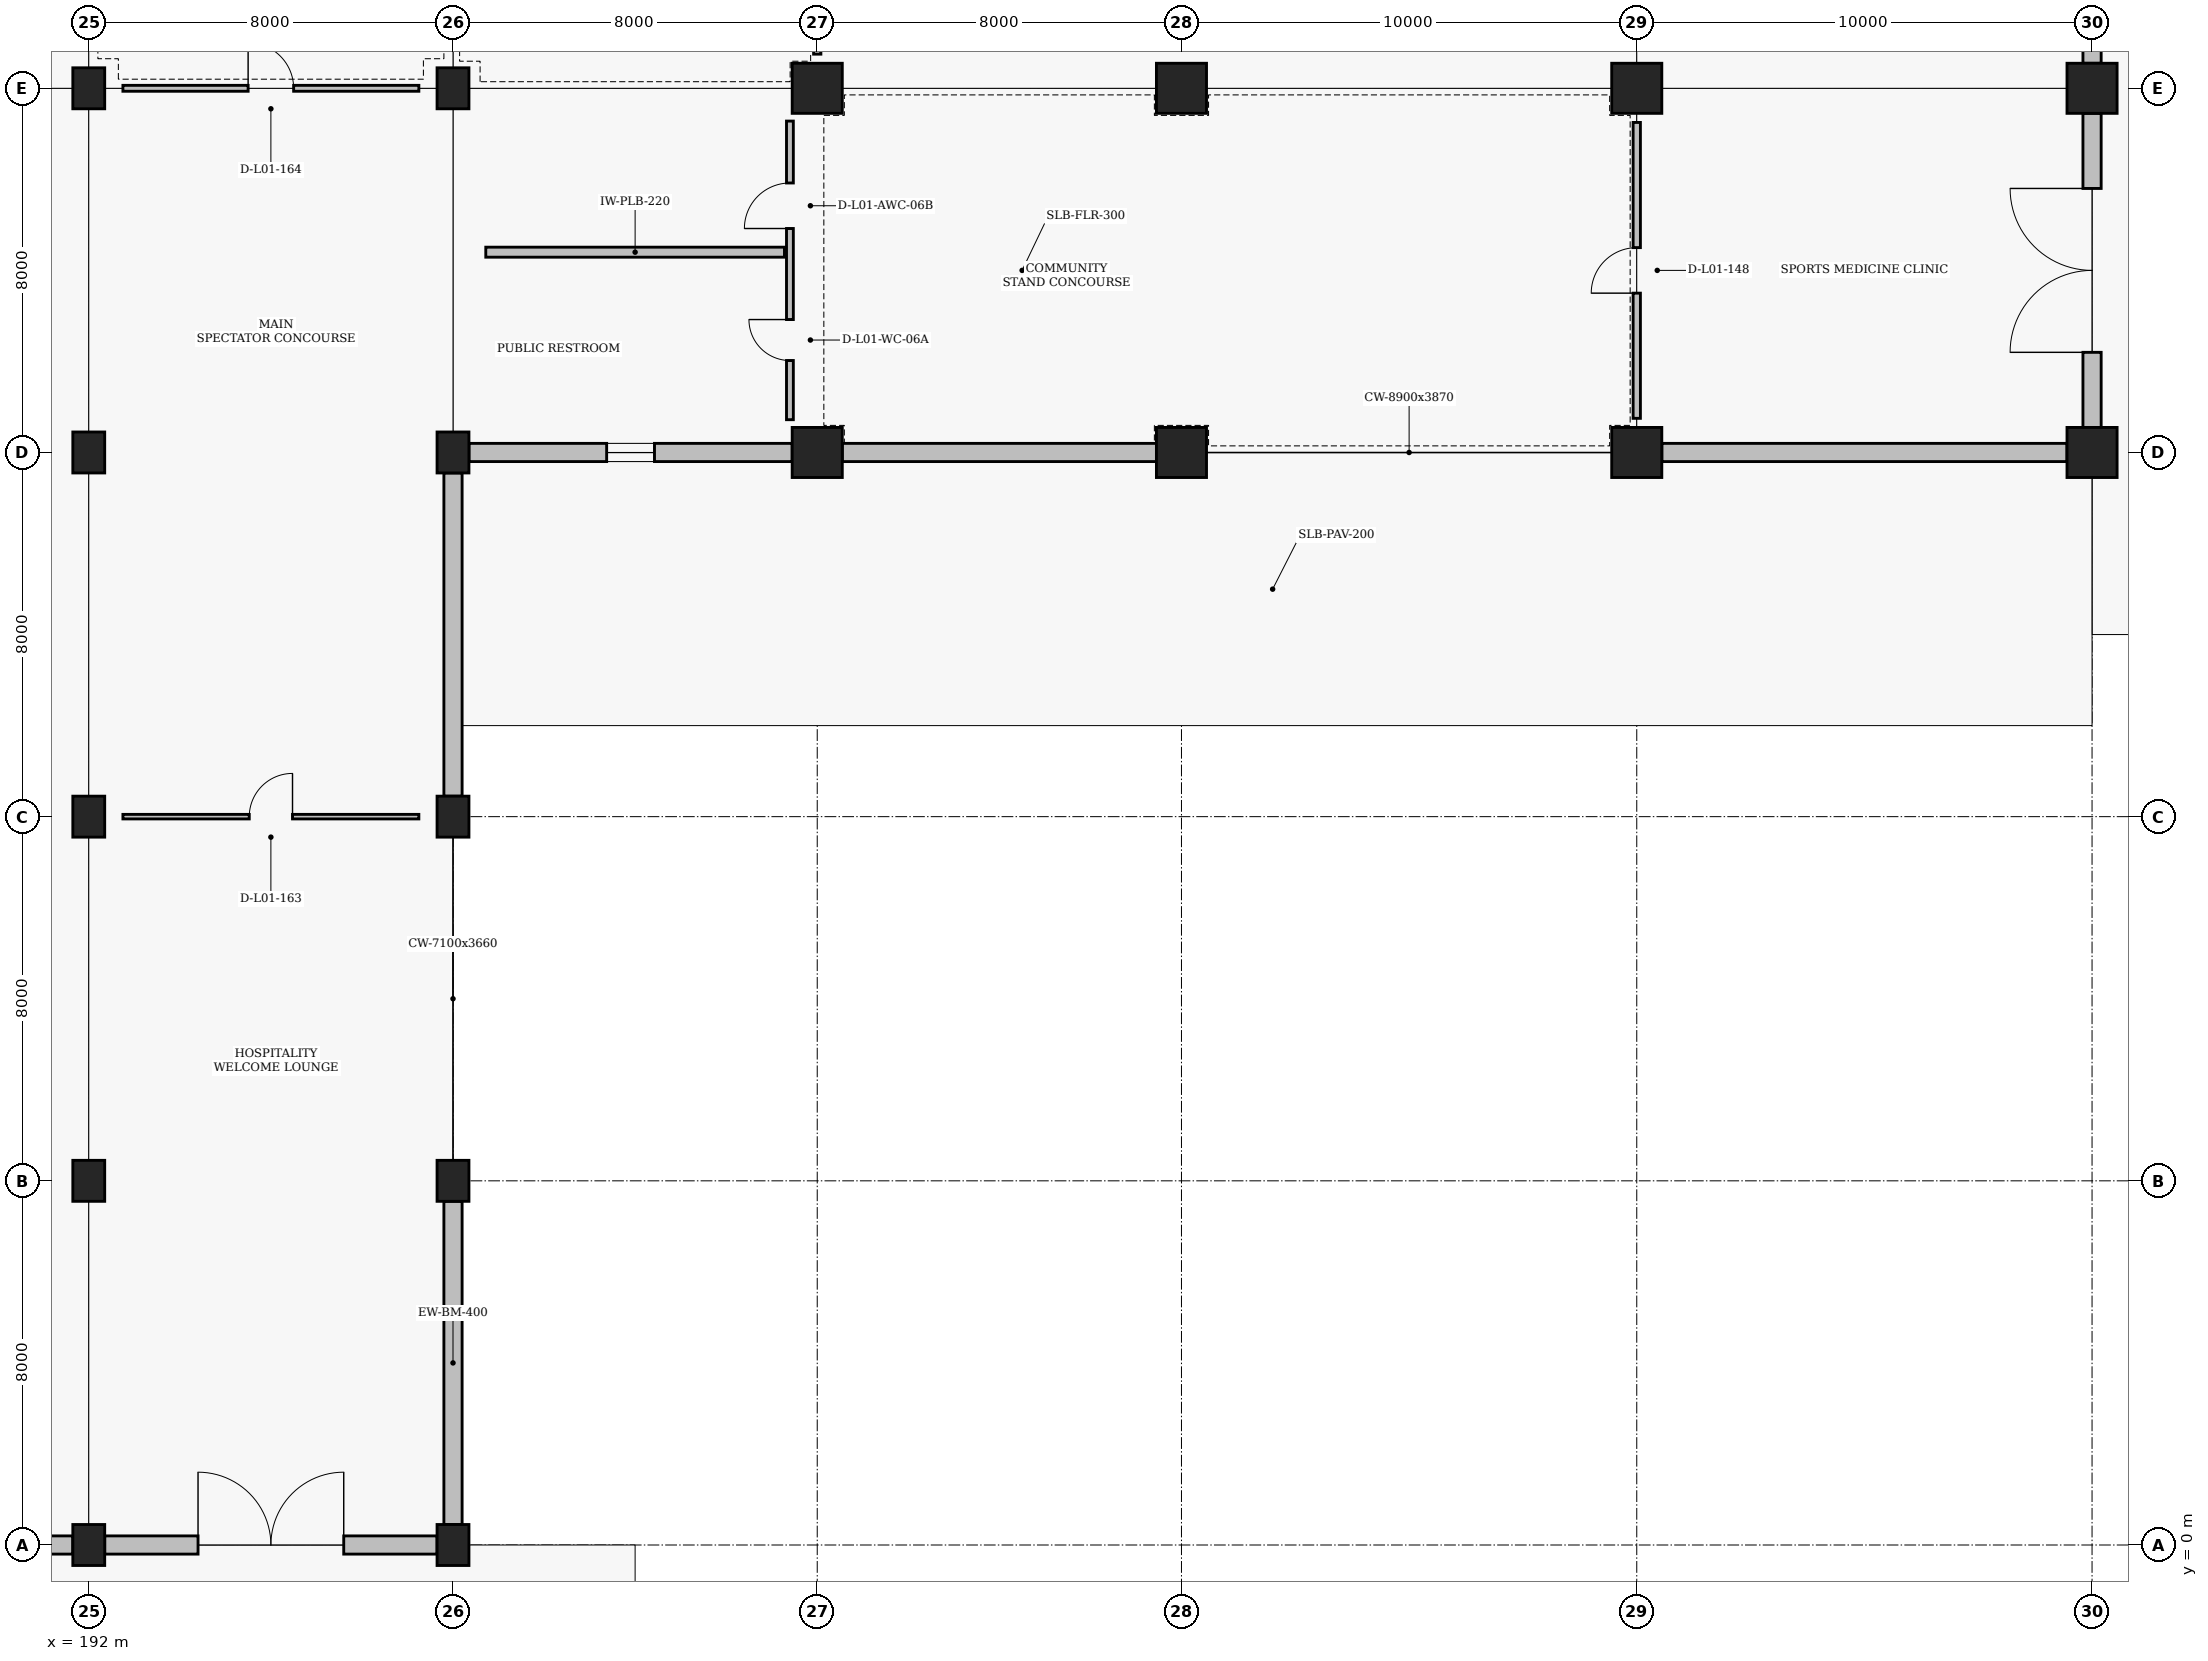
"""IFC4 building model, lengths in metres.
Left out: names, types, materials, properties, quantities, classifications, styles, units other than length and angle.
Written with IfcOpenShell. Run it as: python <this file> out.ifc"""

import sys

from ifc_helpers import new_model, si_unit, direction, frame, frame_2d, origin, origin_2d, place, context, subcontext, project, spatial, rectangle, extrude, element, fill, save


model = new_model("IFC4")
c1 = context("Model", 3, precision=1e-05, world=origin(), true_north=direction((0.0, 1.0)))
c2 = subcontext(c1, "Body", "Model", "MODEL_VIEW")
j1 = project(units=[si_unit("LENGTHUNIT", "METRE"), si_unit("PLANEANGLEUNIT", "RADIAN")], contexts=[c1])
p1 = place(None, origin())
s1 = spatial("IfcSite", under=j1, at=p1, CompositionType="ELEMENT")
p2 = place(p1, origin())
s2 = spatial("IfcBuilding", under=s1, at=p2, CompositionType="ELEMENT")
p3 = place(p2, origin())
s3 = spatial("IfcBuildingStorey", under=s2, at=p3, CompositionType="ELEMENT", Elevation=0.0)
for number, where, z_axis, x_axis in (
    (1, (192.0, 0.0, 0.0), (0.0, 0.0, 1.0), (1.0, 0.0, 0.0)),
    (2, (192.0, 8.0, 0.0), (0.0, 0.0, 1.0), (1.0, 0.0, 0.0)),
    (3, (192.0, 16.0, 0.0), (0.0, 0.0, 1.0), (1.0, 0.0, 0.0)),
    (4, (192.0, 24.0, 0.0), (0.0, 0.0, 1.0), (1.0, 0.0, 0.0)),
    (5, (192.0, 32.0, 0.0), (0.0, 0.0, 1.0), (1.0, 0.0, 0.0)),
    (6, (200.0, 0.0, 0.0), (0.0, 0.0, 1.0), (1.0, 0.0, 0.0)),
    (7, (200.0, 8.0, 0.0), (0.0, 0.0, 1.0), (1.0, 0.0, 0.0)),
    (8, (200.0, 16.0, 0.0), (0.0, 0.0, 1.0), (1.0, 0.0, 0.0)),
    (9, (200.0, 24.0, 0.0), (0.0, 0.0, 1.0), (1.0, 0.0, 0.0)),
    (10, (200.0, 32.0, 0.0), (0.0, 0.0, 1.0), (1.0, 0.0, 0.0)),
):
    element("IfcColumn", number, at=place(p3, frame(where, z_axis=z_axis, x_axis=x_axis)), inside=s3, PredefinedType="COLUMN", context=c2, shape_type="SweptSolid", body=[
        extrude(rectangle(XDim=0.7, YDim=0.9, at=origin_2d()), origin(), (0.0, 0.0, 1.0), 4.8),
    ])
for number, where, z_axis, x_axis in (
    (11, (208.0, 24.0, 0.0), (0.0, 0.0, 1.0), (1.0, 0.0, 0.0)),
    (12, (208.0, 32.0, 0.0), (0.0, 0.0, 1.0), (1.0, 0.0, 0.0)),
    (13, (216.0, 24.0, 0.0), (0.0, 0.0, 1.0), (1.0, 0.0, 0.0)),
    (14, (216.0, 32.0, 0.0), (0.0, 0.0, 1.0), (1.0, 0.0, 0.0)),
    (15, (226.0, 24.0, 0.0), (0.0, 0.0, 1.0), (1.0, 0.0, 0.0)),
    (16, (226.0, 32.0, 0.0), (0.0, 0.0, 1.0), (1.0, 0.0, 0.0)),
    (17, (236.0, 24.0, 0.0), (0.0, 0.0, 1.0), (1.0, 0.0, 0.0)),
    (18, (236.0, 32.0, 0.0), (0.0, 0.0, 1.0), (1.0, 0.0, 0.0)),
):
    element("IfcColumn", number, at=place(p3, frame(where, z_axis=z_axis, x_axis=x_axis)), inside=s3, PredefinedType="COLUMN", context=c2, shape_type="SweptSolid", body=[
        extrude(rectangle(XDim=1.1, YDim=1.1, at=origin_2d()), origin(), (0.0, 0.0, 1.0), 4.8),
    ])
p4 = place(p3, frame((184.35, 0.0, 0.0), z_axis=(0.0, 0.0, 1.0), x_axis=(1.0, 0.0, 0.0)))
e19 = element("IfcWall", 19, at=p4, inside=s3, PredefinedType="SOLIDWALL", context=c2, shape_type="SweptSolid", body=[
    extrude(rectangle(XDim=7.3, YDim=0.4, at=frame_2d((3.65, 0.0))), origin(), (0.0, 0.0, 1.0), 3.81),
])
p5 = place(p4, frame((2.25, 0.0, 0.0)))
e20 = element("IfcOpeningElement", 20, at=p5, cuts=e19, PredefinedType="OPENING", context=c2, shape_type="SweptSolid", body=[
    extrude(rectangle(XDim=2.8, YDim=2.55, at=frame_2d((1.4, 1.275))), frame((0.0, 0.21, 0.0), z_axis=(0.0, -1.0, 0.0), x_axis=(1.0, 0.0, 0.0)), (0.0, 0.0, 1.0), 0.42),
])
p6 = place(p3, frame((192.35, 0.0, 0.0), z_axis=(0.0, 0.0, 1.0), x_axis=(1.0, 0.0, 0.0)))
e21 = element("IfcWall", 21, at=p6, inside=s3, PredefinedType="SOLIDWALL", context=c2, shape_type="SweptSolid", body=[
    extrude(rectangle(XDim=7.3, YDim=0.4, at=frame_2d((3.65, 0.0))), origin(), (0.0, 0.0, 1.0), 3.81),
])
p7 = place(p6, frame((2.05, 0.0, 0.0)))
e22 = element("IfcOpeningElement", 22, at=p7, cuts=e21, PredefinedType="OPENING", context=c2, shape_type="SweptSolid", body=[
    extrude(rectangle(XDim=3.2, YDim=2.7, at=frame_2d((1.6, 1.35))), frame((0.0, 0.21, 0.0), z_axis=(0.0, -1.0, 0.0), x_axis=(1.0, 0.0, 0.0)), (0.0, 0.0, 1.0), 0.42),
])
p8 = place(p3, frame((200.0, 0.45, 0.0), z_axis=(0.0, 0.0, 1.0), x_axis=(0.0, 1.0, 0.0)))
e23 = element("IfcWall", 23, at=p8, inside=s3, PredefinedType="SOLIDWALL", context=c2, shape_type="SweptSolid", body=[
    extrude(rectangle(XDim=7.1, YDim=0.4, at=frame_2d((3.55, 0.0))), origin(), (0.0, 0.0, 1.0), 3.66),
])
p9 = place(p3, frame((200.0, 16.45, 0.0), z_axis=(0.0, 0.0, 1.0), x_axis=(0.0, 1.0, 0.0)))
e24 = element("IfcWall", 24, at=p9, inside=s3, PredefinedType="SOLIDWALL", context=c2, shape_type="SweptSolid", body=[
    extrude(rectangle(XDim=7.1, YDim=0.4, at=frame_2d((3.55, 0.0))), origin(), (0.0, 0.0, 1.0), 3.81),
])
p10 = place(p3, frame((200.35, 24.0, 0.0), z_axis=(0.0, 0.0, 1.0), x_axis=(1.0, 0.0, 0.0)))
e25 = element("IfcWall", 25, at=p10, inside=s3, PredefinedType="SOLIDWALL", context=c2, shape_type="SweptSolid", body=[
    extrude(rectangle(XDim=7.1, YDim=0.4, at=frame_2d((3.55, 0.0))), origin(), (0.0, 0.0, 1.0), 3.81),
])
p11 = place(p10, frame((3.025, 0.0, 0.95)))
e26 = element("IfcOpeningElement", 26, at=p11, cuts=e25, PredefinedType="OPENING", context=c2, shape_type="SweptSolid", body=[
    extrude(rectangle(XDim=1.05, YDim=1.5, at=frame_2d((0.525, 0.75))), frame((0.0, 0.21, 0.0), z_axis=(0.0, -1.0, 0.0), x_axis=(1.0, 0.0, 0.0)), (0.0, 0.0, 1.0), 0.42),
])
p12 = place(p3, frame((208.55, 24.0, 0.0), z_axis=(0.0, 0.0, 1.0), x_axis=(1.0, 0.0, 0.0)))
e27 = element("IfcWall", 27, at=p12, inside=s3, PredefinedType="SOLIDWALL", context=c2, shape_type="SweptSolid", body=[
    extrude(rectangle(XDim=6.9, YDim=0.4, at=frame_2d((3.45, 0.0))), origin(), (0.0, 0.0, 1.0), 3.87),
])
p13 = place(p3, frame((226.55, 24.0, 0.0), z_axis=(0.0, 0.0, 1.0), x_axis=(1.0, 0.0, 0.0)))
e28 = element("IfcWall", 28, at=p13, inside=s3, PredefinedType="SOLIDWALL", context=c2, shape_type="SweptSolid", body=[
    extrude(rectangle(XDim=8.9, YDim=0.4, at=frame_2d((4.45, 0.0))), origin(), (0.0, 0.0, 1.0), 3.87),
])
p14 = place(p3, frame((236.0, 24.55, 0.0), z_axis=(0.0, 0.0, 1.0), x_axis=(0.0, 1.0, 0.0)))
e29 = element("IfcWall", 29, at=p14, inside=s3, PredefinedType="SOLIDWALL", context=c2, shape_type="SweptSolid", body=[
    extrude(rectangle(XDim=6.9, YDim=0.4, at=frame_2d((3.45, 0.0))), origin(), (0.0, 0.0, 1.0), 3.81),
])
p15 = place(p14, frame((1.65, 0.0, 0.0)))
e30 = element("IfcOpeningElement", 30, at=p15, cuts=e29, PredefinedType="OPENING", context=c2, shape_type="SweptSolid", body=[
    extrude(rectangle(XDim=3.6, YDim=2.8, at=frame_2d((1.8, 1.4))), frame((0.0, 0.21, 0.0), z_axis=(0.0, -1.0, 0.0), x_axis=(1.0, 0.0, 0.0)), (0.0, 0.0, 1.0), 0.42),
])
p16 = place(p3, frame((236.0, 32.55, 0.0), z_axis=(0.0, 0.0, 1.0), x_axis=(0.0, 1.0, 0.0)))
e31 = element("IfcWall", 31, at=p16, inside=s3, PredefinedType="SOLIDWALL", context=c2, shape_type="SweptSolid", body=[
    extrude(rectangle(XDim=6.9, YDim=0.4, at=frame_2d((3.45, 0.0))), origin(), (0.0, 0.0, 1.0), 3.81),
])
p17 = place(p16, frame((2.15, 0.0, 0.0)))
e32 = element("IfcOpeningElement", 32, at=p17, cuts=e31, PredefinedType="OPENING", context=c2, shape_type="SweptSolid", body=[
    extrude(rectangle(XDim=2.6, YDim=2.5, at=frame_2d((1.3, 1.25))), frame((0.0, 0.21, 0.0), z_axis=(0.0, -1.0, 0.0), x_axis=(1.0, 0.0, 0.0)), (0.0, 0.0, 1.0), 0.42),
])
p18 = place(p3, frame((200.72, 28.4, 0.0), z_axis=(0.0, 0.0, 1.0), x_axis=(1.0, 0.0, 0.0)))
e33 = element("IfcWall", 33, at=p18, inside=s3, PredefinedType="PLUMBINGWALL", context=c2, shape_type="SweptSolid", body=[
    extrude(rectangle(XDim=6.56, YDim=0.22, at=frame_2d((3.28, 0.0))), origin(), (0.0, 0.0, 1.0), 4.17),
])
p19 = place(p3, frame((207.4, 24.72, 0.0), z_axis=(0.0, 0.0, 1.0), x_axis=(0.0, 1.0, 0.0)))
e34 = element("IfcWall", 34, at=p19, inside=s3, PredefinedType="PARTITIONING", context=c2, shape_type="SweptSolid", body=[
    extrude(rectangle(XDim=6.56, YDim=0.15, at=frame_2d((3.28, 0.0))), origin(), (0.0, 0.0, 1.0), 3.66),
])
p20 = place(p19, frame((1.3, 0.0, 0.0)))
e35 = element("IfcOpeningElement", 35, at=p20, cuts=e34, PredefinedType="OPENING", context=c2, shape_type="SweptSolid", body=[
    extrude(rectangle(XDim=0.9, YDim=2.1, at=frame_2d((0.45, 1.05))), frame((0.0, 0.085, 0.0), z_axis=(0.0, -1.0, 0.0), x_axis=(1.0, 0.0, 0.0)), (0.0, 0.0, 1.0), 0.17),
])
p21 = place(p19, frame((4.2, 0.0, 0.0)))
e36 = element("IfcOpeningElement", 36, at=p21, cuts=e34, PredefinedType="OPENING", context=c2, shape_type="SweptSolid", body=[
    extrude(rectangle(XDim=1.0, YDim=2.15, at=frame_2d((0.5, 1.075))), frame((0.0, 0.085, 0.0), z_axis=(0.0, -1.0, 0.0), x_axis=(1.0, 0.0, 0.0)), (0.0, 0.0, 1.0), 0.17),
])
p22 = place(p3, frame((208.0, 32.75, 0.0), z_axis=(0.0, 0.0, 1.0), x_axis=(0.0, 1.0, 0.0)))
e37 = element("IfcWall", 37, at=p22, inside=s3, PredefinedType="PARTITIONING", context=c2, shape_type="SweptSolid", body=[
    extrude(rectangle(XDim=6.5, YDim=0.16, at=frame_2d((3.25, 0.0))), origin(), (0.0, 0.0, 1.0), 3.81),
])
p23 = place(p22, frame((2.775, 0.0, 0.0)))
e38 = element("IfcOpeningElement", 38, at=p23, cuts=e37, PredefinedType="OPENING", context=c2, shape_type="SweptSolid", body=[
    extrude(rectangle(XDim=0.95, YDim=2.1, at=frame_2d((0.475, 1.05))), frame((0.0, 0.09, 0.0), z_axis=(0.0, -1.0, 0.0), x_axis=(1.0, 0.0, 0.0)), (0.0, 0.0, 1.0), 0.18),
])
p24 = place(p3, frame((226.0, 24.75, 0.0), z_axis=(0.0, 0.0, 1.0), x_axis=(0.0, 1.0, 0.0)))
e39 = element("IfcWall", 39, at=p24, inside=s3, PredefinedType="PARTITIONING", context=c2, shape_type="SweptSolid", body=[
    extrude(rectangle(XDim=6.5, YDim=0.16, at=frame_2d((3.25, 0.0))), origin(), (0.0, 0.0, 1.0), 3.87),
])
p25 = place(p24, frame((2.75, 0.0, 0.0)))
e40 = element("IfcOpeningElement", 40, at=p25, cuts=e39, PredefinedType="OPENING", context=c2, shape_type="SweptSolid", body=[
    extrude(rectangle(XDim=1.0, YDim=2.1, at=frame_2d((0.5, 1.05))), frame((0.0, 0.09, 0.0), z_axis=(0.0, -1.0, 0.0), x_axis=(1.0, 0.0, 0.0)), (0.0, 0.0, 1.0), 0.18),
])
p26 = place(p3, frame((192.75, 16.0, 0.0), z_axis=(0.0, 0.0, 1.0), x_axis=(1.0, 0.0, 0.0)))
e41 = element("IfcWall", 41, at=p26, inside=s3, PredefinedType="PARTITIONING", context=c2, shape_type="SweptSolid", body=[
    extrude(rectangle(XDim=6.5, YDim=0.1, at=frame_2d((3.25, 0.0))), origin(), (0.0, 0.0, 1.0), 3.91),
])
p27 = place(p26, frame((2.775, 0.0, 0.0)))
e42 = element("IfcOpeningElement", 42, at=p27, cuts=e41, PredefinedType="OPENING", context=c2, shape_type="SweptSolid", body=[
    extrude(rectangle(XDim=0.95, YDim=2.1, at=frame_2d((0.475, 1.05))), frame((0.0, 0.06, 0.0), z_axis=(0.0, -1.0, 0.0), x_axis=(1.0, 0.0, 0.0)), (0.0, 0.0, 1.0), 0.12),
])
p28 = place(p3, frame((192.75, 32.0, 0.0), z_axis=(0.0, 0.0, 1.0), x_axis=(1.0, 0.0, 0.0)))
e43 = element("IfcWall", 43, at=p28, inside=s3, PredefinedType="PARTITIONING", context=c2, shape_type="SweptSolid", body=[
    extrude(rectangle(XDim=6.5, YDim=0.13, at=frame_2d((3.25, 0.0))), origin(), (0.0, 0.0, 1.0), 3.91),
])
p29 = place(p28, frame((2.75, 0.0, 0.0)))
e44 = element("IfcOpeningElement", 44, at=p29, cuts=e43, PredefinedType="OPENING", context=c2, shape_type="SweptSolid", body=[
    extrude(rectangle(XDim=1.0, YDim=2.1, at=frame_2d((0.5, 1.05))), frame((0.0, 0.075, 0.0), z_axis=(0.0, -1.0, 0.0), x_axis=(1.0, 0.0, 0.0)), (0.0, 0.0, 1.0), 0.15),
])
p30 = place(p7, origin())
e45 = element("IfcDoor", 45, at=p30, inside=s3, OperationType="DOUBLE_SWING_LEFT", PredefinedType="DOOR", context=c2, shape_type="SweptSolid", body=[
    extrude(rectangle(XDim=3.2, YDim=2.7, at=frame_2d((1.6, 1.35))), frame((0.0, 0.025, 0.0), z_axis=(0.0, -1.0, 0.0), x_axis=(1.0, 0.0, 0.0)), (0.0, 0.0, 1.0), 0.05),
])
fill(e22, e45)
p31 = place(p11, origin())
e46 = element("IfcWindow", 46, at=p31, inside=s3, PartitioningType="SINGLE_PANEL", PredefinedType="WINDOW", context=c2, shape_type="SweptSolid", body=[
    extrude(rectangle(XDim=1.05, YDim=1.5, at=frame_2d((0.525, 0.75))), frame((0.0, 0.03, 0.0), z_axis=(0.0, -1.0, 0.0), x_axis=(1.0, 0.0, 0.0)), (0.0, 0.0, 1.0), 0.06),
])
fill(e26, e46)
p32 = place(p15, origin())
e47 = element("IfcDoor", 47, at=p32, inside=s3, OperationType="DOUBLE_SWING_LEFT", PredefinedType="DOOR", context=c2, shape_type="SweptSolid", body=[
    extrude(rectangle(XDim=3.6, YDim=2.8, at=frame_2d((1.8, 1.4))), frame((0.0, 0.025, 0.0), z_axis=(0.0, -1.0, 0.0), x_axis=(1.0, 0.0, 0.0)), (0.0, 0.0, 1.0), 0.05),
])
fill(e30, e47)
p33 = place(p20, origin())
e48 = element("IfcDoor", 48, at=p33, inside=s3, OperationType="SINGLE_SWING_RIGHT", PredefinedType="DOOR", context=c2, shape_type="SweptSolid", body=[
    extrude(rectangle(XDim=0.9, YDim=2.1, at=frame_2d((0.45, 1.05))), frame((0.0, 0.025, 0.0), z_axis=(0.0, -1.0, 0.0), x_axis=(1.0, 0.0, 0.0)), (0.0, 0.0, 1.0), 0.05),
])
fill(e35, e48)
p34 = place(p21, origin())
e49 = element("IfcDoor", 49, at=p34, inside=s3, OperationType="SINGLE_SWING_LEFT", PredefinedType="DOOR", context=c2, shape_type="SweptSolid", body=[
    extrude(rectangle(XDim=1.0, YDim=2.15, at=frame_2d((0.5, 1.075))), frame((0.0, 0.025, 0.0), z_axis=(0.0, -1.0, 0.0), x_axis=(1.0, 0.0, 0.0)), (0.0, 0.0, 1.0), 0.05),
])
fill(e36, e49)
p35 = place(p25, origin())
e50 = element("IfcDoor", 50, at=p35, inside=s3, OperationType="SINGLE_SWING_LEFT", PredefinedType="DOOR", context=c2, shape_type="SweptSolid", body=[
    extrude(rectangle(XDim=1.0, YDim=2.1, at=frame_2d((0.5, 1.05))), frame((0.0, 0.025, 0.0), z_axis=(0.0, -1.0, 0.0), x_axis=(1.0, 0.0, 0.0)), (0.0, 0.0, 1.0), 0.05),
])
fill(e40, e50)
p36 = place(p27, origin())
e51 = element("IfcDoor", 51, at=p36, inside=s3, OperationType="SINGLE_SWING_RIGHT", PredefinedType="DOOR", context=c2, shape_type="SweptSolid", body=[
    extrude(rectangle(XDim=0.95, YDim=2.1, at=frame_2d((0.475, 1.05))), frame((0.0, 0.025, 0.0), z_axis=(0.0, -1.0, 0.0), x_axis=(1.0, 0.0, 0.0)), (0.0, 0.0, 1.0), 0.05),
])
fill(e42, e51)
p37 = place(p29, origin())
e52 = element("IfcDoor", 52, at=p37, inside=s3, OperationType="SINGLE_SWING_LEFT", PredefinedType="DOOR", context=c2, shape_type="SweptSolid", body=[
    extrude(rectangle(XDim=1.0, YDim=2.1, at=frame_2d((0.5, 1.05))), frame((0.0, 0.025, 0.0), z_axis=(0.0, -1.0, 0.0), x_axis=(1.0, 0.0, 0.0)), (0.0, 0.0, 1.0), 0.05),
])
fill(e44, e52)
save(model, sys.argv[1])
